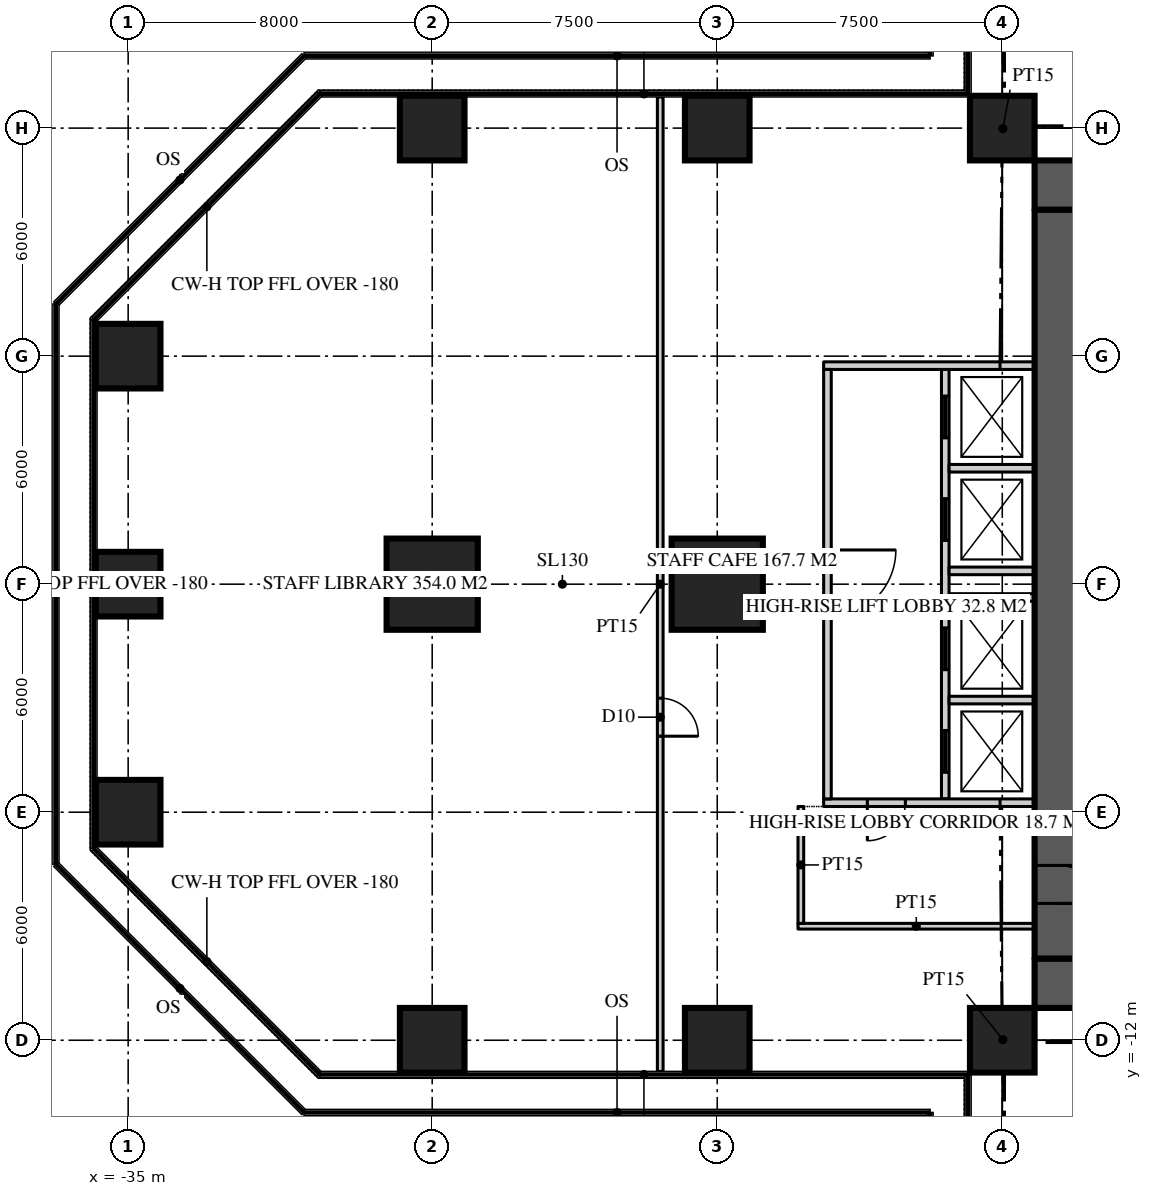
"""IFC4 building model, lengths in metres.
Left out: names, types, materials, properties, quantities, classifications, styles, units other than length and angle.
Written with IfcOpenShell. Run it as: python <this file> out.ifc"""

import sys

from ifc_helpers import new_model, si_unit, direction, frame, frame_2d, origin, origin_2d, place, context, subcontext, project, spatial, rectangle, extrude, element, fill, save


model = new_model("IFC4")
c1 = context("Model", 3, precision=1e-05, world=origin(), true_north=direction((0.0, 1.0)))
c2 = subcontext(c1, "Body", "Model", "MODEL_VIEW")
j1 = project(units=[si_unit("LENGTHUNIT", "METRE"), si_unit("PLANEANGLEUNIT", "RADIAN")], contexts=[c1])
p1 = place(None, origin())
s1 = spatial("IfcSite", under=j1, at=p1, CompositionType="ELEMENT")
p2 = place(p1, origin())
s2 = spatial("IfcBuilding", under=s1, at=p2, CompositionType="ELEMENT")
p3 = place(p2, frame((0.0, 0.0, 194.4)))
s3 = spatial("IfcBuildingStorey", under=s2, at=p3, CompositionType="ELEMENT", Elevation=194.4)
p4 = place(p3, frame((-11.15, 10.5, 0.0), z_axis=(0.0, 0.0, 1.0), x_axis=(1.0, 0.0, 0.0)))
e1 = element("IfcWall", 1, at=p4, inside=s3, PredefinedType="SHEAR", context=c2, shape_type="SweptSolid", body=[
    extrude(rectangle(XDim=22.3, YDim=1.3, at=frame_2d((11.15, 0.0))), origin(), (0.0, 0.0, 1.0), 4.5),
])
p5 = place(p4, frame((4.25, 0.0, 0.0)))
e2 = element("IfcOpeningElement", 2, at=p5, cuts=e1, PredefinedType="OPENING", context=c2, shape_type="SweptSolid", body=[
    extrude(rectangle(XDim=1.8, YDim=2.2, at=frame_2d((0.9, 1.1))), frame((0.0, 0.66, 0.0), z_axis=(0.0, -1.0, 0.0), x_axis=(1.0, 0.0, 0.0)), (0.0, 0.0, 1.0), 1.32),
])
p6 = place(p4, frame((16.25, 0.0, 0.0)))
e3 = element("IfcOpeningElement", 3, at=p6, cuts=e1, PredefinedType="OPENING", context=c2, shape_type="SweptSolid", body=[
    extrude(rectangle(XDim=1.8, YDim=2.2, at=frame_2d((0.9, 1.1))), frame((0.0, 0.66, 0.0), z_axis=(0.0, -1.0, 0.0), x_axis=(1.0, 0.0, 0.0)), (0.0, 0.0, 1.0), 1.32),
])
p7 = place(p3, frame((11.15, -10.5, 0.0), z_axis=(0.0, 0.0, 1.0), x_axis=(-1.0, 0.0, 0.0)))
e4 = element("IfcWall", 4, at=p7, inside=s3, PredefinedType="SHEAR", context=c2, shape_type="SweptSolid", body=[
    extrude(rectangle(XDim=22.3, YDim=1.3, at=frame_2d((11.15, 0.0))), origin(), (0.0, 0.0, 1.0), 4.5),
])
p8 = place(p7, frame((16.25, 0.0, 0.0)))
e5 = element("IfcOpeningElement", 5, at=p8, cuts=e4, PredefinedType="OPENING", context=c2, shape_type="SweptSolid", body=[
    extrude(rectangle(XDim=1.8, YDim=2.2, at=frame_2d((0.9, 1.1))), frame((0.0, 0.66, 0.0), z_axis=(0.0, -1.0, 0.0), x_axis=(1.0, 0.0, 0.0)), (0.0, 0.0, 1.0), 1.32),
])
p9 = place(p7, frame((4.25, 0.0, 0.0)))
e6 = element("IfcOpeningElement", 6, at=p9, cuts=e4, PredefinedType="OPENING", context=c2, shape_type="SweptSolid", body=[
    extrude(rectangle(XDim=1.8, YDim=2.2, at=frame_2d((0.9, 1.1))), frame((0.0, 0.66, 0.0), z_axis=(0.0, -1.0, 0.0), x_axis=(1.0, 0.0, 0.0)), (0.0, 0.0, 1.0), 1.32),
])
p10 = place(p3, frame((-10.5, 9.85, 0.0), z_axis=(0.0, 0.0, 1.0), x_axis=(0.0, -1.0, 0.0)))
e7 = element("IfcWall", 7, at=p10, inside=s3, PredefinedType="SHEAR", context=c2, shape_type="SweptSolid", body=[
    extrude(rectangle(XDim=19.7, YDim=1.3, at=frame_2d((9.85, 0.0))), origin(), (0.0, 0.0, 1.0), 4.5),
])
p11 = place(p10, frame((17.25, 0.0, 0.0)))
e8 = element("IfcOpeningElement", 8, at=p11, cuts=e7, PredefinedType="OPENING", context=c2, shape_type="SweptSolid", body=[
    extrude(rectangle(XDim=1.0, YDim=2.2, at=frame_2d((0.5, 1.1))), frame((0.0, 0.66, 0.0), z_axis=(0.0, -1.0, 0.0), x_axis=(1.0, 0.0, 0.0)), (0.0, 0.0, 1.0), 1.32),
])
for number, where, z_axis, x_axis in (
    (9, (-27.0, -12.0, 0.0), (0.0, 0.0, 1.0), (1.0, 0.0, 0.0)),
    (10, (-19.5, -12.0, 0.0), (0.0, 0.0, 1.0), (1.0, 0.0, 0.0)),
    (11, (-12.0, -12.0, 0.0), (0.0, 0.0, 1.0), (1.0, 0.0, 0.0)),
    (12, (-35.0, -6.0, 0.0), (0.0, 0.0, 1.0), (1.0, 0.0, 0.0)),
    (13, (-35.0, 0.0, 0.0), (0.0, 0.0, 1.0), (1.0, 0.0, 0.0)),
):
    element("IfcColumn", number, at=place(p3, frame(where, z_axis=z_axis, x_axis=x_axis)), inside=s3, PredefinedType="COLUMN", context=c2, shape_type="SweptSolid", body=[
        extrude(rectangle(XDim=1.7, YDim=1.7, at=origin_2d()), origin(), (0.0, 0.0, 1.0), 4.5),
    ])
for number, where, z_axis, x_axis in (
    (14, (-27.0, 0.0, 0.0), (0.0, 0.0, 1.0), (1.0, 0.0, 0.0)),
    (15, (-19.5, 0.0, 0.0), (0.0, 0.0, 1.0), (1.0, 0.0, 0.0)),
):
    element("IfcColumn", number, at=place(p3, frame(where, z_axis=z_axis, x_axis=x_axis)), inside=s3, PredefinedType="COLUMN", context=c2, shape_type="SweptSolid", body=[
        extrude(rectangle(XDim=2.4, YDim=2.4, at=origin_2d()), origin(), (0.0, 0.0, 1.0), 4.5),
    ])
for number, where, z_axis, x_axis in (
    (16, (-35.0, 6.0, 0.0), (0.0, 0.0, 1.0), (1.0, 0.0, 0.0)),
    (17, (-27.0, 12.0, 0.0), (0.0, 0.0, 1.0), (1.0, 0.0, 0.0)),
    (18, (-19.5, 12.0, 0.0), (0.0, 0.0, 1.0), (1.0, 0.0, 0.0)),
    (19, (-12.0, 12.0, 0.0), (0.0, 0.0, 1.0), (1.0, 0.0, 0.0)),
):
    element("IfcColumn", number, at=place(p3, frame(where, z_axis=z_axis, x_axis=x_axis)), inside=s3, PredefinedType="COLUMN", context=c2, shape_type="SweptSolid", body=[
        extrude(rectangle(XDim=1.7, YDim=1.7, at=origin_2d()), origin(), (0.0, 0.0, 1.0), 4.5),
    ])
p12 = place(p3, frame((-21.0, 12.82, 0.0), z_axis=(0.0, 0.0, 1.0), x_axis=(0.0, -1.0, 0.0)))
e20 = element("IfcWall", 20, at=p12, inside=s3, PredefinedType="PARTITIONING", context=c2, shape_type="SweptSolid", body=[
    extrude(rectangle(XDim=25.64, YDim=0.15, at=frame_2d((12.82, 0.0))), origin(), (0.0, 0.0, 1.0), 4.32),
])
p13 = place(p12, frame((15.82, 0.0, 0.0)))
e21 = element("IfcOpeningElement", 21, at=p13, cuts=e20, PredefinedType="OPENING", context=c2, shape_type="SweptSolid", body=[
    extrude(rectangle(XDim=1.0, YDim=2.2, at=frame_2d((0.5, 1.1))), frame((0.0, 0.085, 0.0), z_axis=(0.0, -1.0, 0.0), x_axis=(1.0, 0.0, 0.0)), (0.0, 0.0, 1.0), 0.17),
])
p14 = place(p3, frame((-13.5, 5.65, 0.0), z_axis=(0.0, 0.0, 1.0), x_axis=(0.0, -1.0, 0.0)))
e22 = element("IfcWall", 22, at=p14, inside=s3, PredefinedType="SOLIDWALL", context=c2, shape_type="SweptSolid", body=[
    extrude(rectangle(XDim=11.3, YDim=0.2, at=frame_2d((5.65, 0.0))), origin(), (0.0, 0.0, 1.0), 4.3),
])
p15 = place(p14, frame((0.7, 0.0, 0.0)))
e23 = element("IfcOpeningElement", 23, at=p15, cuts=e22, PredefinedType="OPENING", context=c2, shape_type="SweptSolid", body=[
    extrude(rectangle(XDim=1.1, YDim=2.2, at=frame_2d((0.55, 1.1))), frame((0.0, 0.11, 0.0), z_axis=(0.0, -1.0, 0.0), x_axis=(1.0, 0.0, 0.0)), (0.0, 0.0, 1.0), 0.22),
])
p16 = place(p14, frame((3.4, 0.0, 0.0)))
e24 = element("IfcOpeningElement", 24, at=p16, cuts=e22, PredefinedType="OPENING", context=c2, shape_type="SweptSolid", body=[
    extrude(rectangle(XDim=1.1, YDim=2.2, at=frame_2d((0.55, 1.1))), frame((0.0, 0.11, 0.0), z_axis=(0.0, -1.0, 0.0), x_axis=(1.0, 0.0, 0.0)), (0.0, 0.0, 1.0), 0.22),
])
p17 = place(p14, frame((6.8, 0.0, 0.0)))
e25 = element("IfcOpeningElement", 25, at=p17, cuts=e22, PredefinedType="OPENING", context=c2, shape_type="SweptSolid", body=[
    extrude(rectangle(XDim=1.1, YDim=2.2, at=frame_2d((0.55, 1.1))), frame((0.0, 0.11, 0.0), z_axis=(0.0, -1.0, 0.0), x_axis=(1.0, 0.0, 0.0)), (0.0, 0.0, 1.0), 0.22),
])
p18 = place(p14, frame((9.5, 0.0, 0.0)))
e26 = element("IfcOpeningElement", 26, at=p18, cuts=e22, PredefinedType="OPENING", context=c2, shape_type="SweptSolid", body=[
    extrude(rectangle(XDim=1.1, YDim=2.2, at=frame_2d((0.55, 1.1))), frame((0.0, 0.11, 0.0), z_axis=(0.0, -1.0, 0.0), x_axis=(1.0, 0.0, 0.0)), (0.0, 0.0, 1.0), 0.22),
])
p19 = place(p3, frame((-11.15, 5.75, 0.0), z_axis=(0.0, 0.0, 1.0), x_axis=(-1.0, 0.0, 0.0)))
e27 = element("IfcWall", 27, at=p19, inside=s3, PredefinedType="SOLIDWALL", context=c2, shape_type="SweptSolid", body=[
    extrude(rectangle(XDim=5.55, YDim=0.2, at=frame_2d((2.775, 0.0))), origin(), (0.0, 0.0, 1.0), 4.3),
])
p20 = place(p3, frame((-11.15, -5.75, 0.0), z_axis=(0.0, 0.0, 1.0), x_axis=(-1.0, 0.0, 0.0)))
e28 = element("IfcWall", 28, at=p20, inside=s3, PredefinedType="SOLIDWALL", context=c2, shape_type="SweptSolid", body=[
    extrude(rectangle(XDim=5.55, YDim=0.2, at=frame_2d((2.775, 0.0))), origin(), (0.0, 0.0, 1.0), 4.3),
])
p21 = place(p20, frame((3.4, 0.0, 0.0)))
e29 = element("IfcOpeningElement", 29, at=p21, cuts=e28, PredefinedType="OPENING", context=c2, shape_type="SweptSolid", body=[
    extrude(rectangle(XDim=1.0, YDim=2.2, at=frame_2d((0.5, 1.1))), frame((0.0, 0.11, 0.0), z_axis=(0.0, -1.0, 0.0), x_axis=(1.0, 0.0, 0.0)), (0.0, 0.0, 1.0), 0.22),
])
p22 = place(p3, frame((-11.15, 3.05, 0.0), z_axis=(0.0, 0.0, 1.0), x_axis=(-1.0, 0.0, 0.0)))
e30 = element("IfcWall", 30, at=p22, inside=s3, PredefinedType="SOLIDWALL", context=c2, shape_type="SweptSolid", body=[
    extrude(rectangle(XDim=2.25, YDim=0.2, at=frame_2d((1.125, 0.0))), origin(), (0.0, 0.0, 1.0), 4.3),
])
for number, where, z_axis, x_axis in (
    (31, (-11.15, 0.35, 0.0), (0.0, 0.0, 1.0), (-1.0, 0.0, 0.0)),
    (32, (-11.15, -0.35, 0.0), (0.0, 0.0, 1.0), (-1.0, 0.0, 0.0)),
):
    element("IfcWall", number, at=place(p3, frame(where, z_axis=z_axis, x_axis=x_axis)), inside=s3, PredefinedType="SOLIDWALL", context=c2, shape_type="SweptSolid", body=[
        extrude(rectangle(XDim=2.25, YDim=0.2, at=frame_2d((1.125, 0.0))), origin(), (0.0, 0.0, 1.0), 3.32),
    ])
p23 = place(p3, frame((-11.15, -3.05, 0.0), z_axis=(0.0, 0.0, 1.0), x_axis=(-1.0, 0.0, 0.0)))
e33 = element("IfcWall", 33, at=p23, inside=s3, PredefinedType="SOLIDWALL", context=c2, shape_type="SweptSolid", body=[
    extrude(rectangle(XDim=2.25, YDim=0.2, at=frame_2d((1.125, 0.0))), origin(), (0.0, 0.0, 1.0), 4.3),
])
p24 = place(p3, frame((-16.6, 5.65, 0.0), z_axis=(0.0, 0.0, 1.0), x_axis=(0.0, -1.0, 0.0)))
e34 = element("IfcWall", 34, at=p24, inside=s3, PredefinedType="SOLIDWALL", context=c2, shape_type="SweptSolid", body=[
    extrude(rectangle(XDim=11.3, YDim=0.2, at=frame_2d((5.65, 0.0))), origin(), (0.0, 0.0, 1.0), 3.63),
])
p25 = place(p24, frame((4.75, 0.0, 0.0)))
e35 = element("IfcOpeningElement", 35, at=p25, cuts=e34, PredefinedType="OPENING", context=c2, shape_type="SweptSolid", body=[
    extrude(rectangle(XDim=1.8, YDim=2.2, at=frame_2d((0.9, 1.1))), frame((0.0, 0.11, 0.0), z_axis=(0.0, -1.0, 0.0), x_axis=(1.0, 0.0, 0.0)), (0.0, 0.0, 1.0), 0.22),
])
for number, where, z_axis, x_axis in (
    (36, (-11.15, 11.15, 0.0), (0.0, 0.0, 1.0), (-0.707, 0.707, 0.0)),
    (37, (-11.15, -11.15, 0.0), (0.0, 0.0, 1.0), (-0.707, -0.707, 0.0)),
):
    element("IfcWall", number, at=place(p3, frame(where, z_axis=z_axis, x_axis=x_axis)), inside=s3, PredefinedType="PARTITIONING", context=c2, shape_type="SweptSolid", body=[
        extrude(rectangle(XDim=2.362, YDim=0.15, at=frame_2d((1.181, 0.0))), origin(), (0.0, 0.0, 1.0), 4.32),
    ])
p26 = place(p3, frame((-11.15, -9.0, 0.0), z_axis=(0.0, 0.0, 1.0), x_axis=(-1.0, 0.0, 0.0)))
e38 = element("IfcWall", 38, at=p26, inside=s3, PredefinedType="PARTITIONING", context=c2, shape_type="SweptSolid", body=[
    extrude(rectangle(XDim=6.225, YDim=0.15, at=frame_2d((3.113, 0.0))), origin(), (0.0, 0.0, 1.0), 4.32),
])
p27 = place(p3, frame((-17.3, -5.85, 0.0), z_axis=(0.0, 0.0, 1.0), x_axis=(0.0, -1.0, 0.0)))
e39 = element("IfcWall", 39, at=p27, inside=s3, PredefinedType="PARTITIONING", context=c2, shape_type="SweptSolid", body=[
    extrude(rectangle(XDim=3.075, YDim=0.15, at=frame_2d((1.538, 0.0))), origin(), (0.0, 0.0, 1.0), 4.32),
])
p28 = place(p11, origin())
e40 = element("IfcDoor", 40, at=p28, inside=s3, OperationType="SINGLE_SWING_RIGHT", PredefinedType="DOOR", context=c2, shape_type="SweptSolid", body=[
    extrude(rectangle(XDim=1.0, YDim=2.2, at=frame_2d((0.5, 1.1))), frame((0.0, 0.025, 0.0), z_axis=(0.0, -1.0, 0.0), x_axis=(1.0, 0.0, 0.0)), (0.0, 0.0, 1.0), 0.05),
])
fill(e8, e40)
p29 = place(p13, origin())
e41 = element("IfcDoor", 41, at=p29, inside=s3, OperationType="SINGLE_SWING_RIGHT", PredefinedType="DOOR", context=c2, shape_type="SweptSolid", body=[
    extrude(rectangle(XDim=1.0, YDim=2.2, at=frame_2d((0.5, 1.1))), frame((0.0, 0.025, 0.0), z_axis=(0.0, -1.0, 0.0), x_axis=(1.0, 0.0, 0.0)), (0.0, 0.0, 1.0), 0.05),
])
fill(e21, e41)
p30 = place(p25, origin())
e42 = element("IfcDoor", 42, at=p30, inside=s3, OperationType="DOUBLE_DOOR_DOUBLE_SWING", PredefinedType="DOOR", context=c2, shape_type="SweptSolid", body=[
    extrude(rectangle(XDim=1.8, YDim=2.2, at=frame_2d((0.9, 1.1))), frame((0.0, 0.025, 0.0), z_axis=(0.0, -1.0, 0.0), x_axis=(1.0, 0.0, 0.0)), (0.0, 0.0, 1.0), 0.05),
])
fill(e35, e42)
p31 = place(p15, origin())
e43 = element("IfcDoor", 43, at=p31, inside=s3, OperationType="SLIDING_TO_LEFT", PredefinedType="DOOR", context=c2, shape_type="SweptSolid", body=[
    extrude(rectangle(XDim=1.1, YDim=2.2, at=frame_2d((0.55, 1.1))), frame((0.0, 0.025, 0.0), z_axis=(0.0, -1.0, 0.0), x_axis=(1.0, 0.0, 0.0)), (0.0, 0.0, 1.0), 0.05),
])
fill(e23, e43)
p32 = place(p16, origin())
e44 = element("IfcDoor", 44, at=p32, inside=s3, OperationType="SLIDING_TO_LEFT", PredefinedType="DOOR", context=c2, shape_type="SweptSolid", body=[
    extrude(rectangle(XDim=1.1, YDim=2.2, at=frame_2d((0.55, 1.1))), frame((0.0, 0.025, 0.0), z_axis=(0.0, -1.0, 0.0), x_axis=(1.0, 0.0, 0.0)), (0.0, 0.0, 1.0), 0.05),
])
fill(e24, e44)
p33 = place(p17, origin())
e45 = element("IfcDoor", 45, at=p33, inside=s3, OperationType="SLIDING_TO_LEFT", PredefinedType="DOOR", context=c2, shape_type="SweptSolid", body=[
    extrude(rectangle(XDim=1.1, YDim=2.2, at=frame_2d((0.55, 1.1))), frame((0.0, 0.025, 0.0), z_axis=(0.0, -1.0, 0.0), x_axis=(1.0, 0.0, 0.0)), (0.0, 0.0, 1.0), 0.05),
])
fill(e25, e45)
p34 = place(p18, origin())
e46 = element("IfcDoor", 46, at=p34, inside=s3, OperationType="SLIDING_TO_LEFT", PredefinedType="DOOR", context=c2, shape_type="SweptSolid", body=[
    extrude(rectangle(XDim=1.1, YDim=2.2, at=frame_2d((0.55, 1.1))), frame((0.0, 0.025, 0.0), z_axis=(0.0, -1.0, 0.0), x_axis=(1.0, 0.0, 0.0)), (0.0, 0.0, 1.0), 0.05),
])
fill(e26, e46)
p35 = place(p21, origin())
e47 = element("IfcDoor", 47, at=p35, inside=s3, OperationType="SINGLE_SWING_RIGHT", PredefinedType="DOOR", context=c2, shape_type="SweptSolid", body=[
    extrude(rectangle(XDim=1.0, YDim=2.2, at=frame_2d((0.5, 1.1))), frame((0.0, 0.025, 0.0), z_axis=(0.0, -1.0, 0.0), x_axis=(1.0, 0.0, 0.0)), (0.0, 0.0, 1.0), 0.05),
])
fill(e29, e47)
save(model, sys.argv[1])
